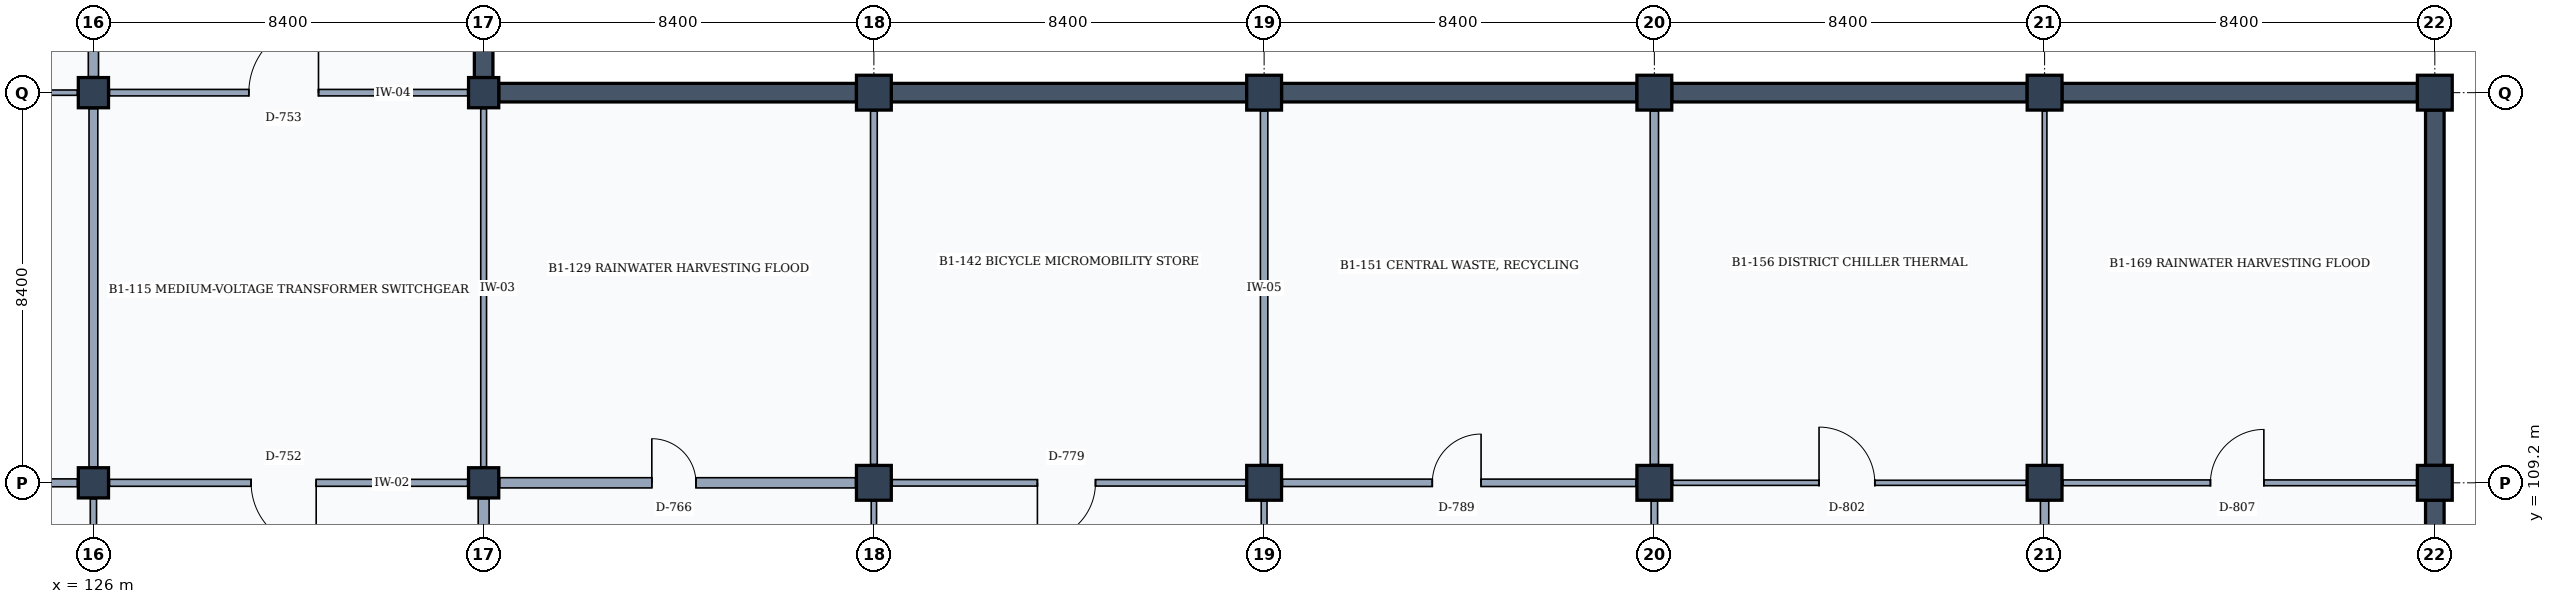
"""IFC4 building model, lengths in metres.
Left out: names, types, materials, properties, quantities, classifications, styles, units other than length and angle.
Written with IfcOpenShell. Run it as: python <this file> out.ifc"""

import sys

from ifc_helpers import new_model, si_unit, direction, frame, frame_2d, origin, origin_2d, place, context, subcontext, project, spatial, rectangle, extrude, element, fill, save


model = new_model("IFC4")
c1 = context("Model", 3, precision=1e-05, world=origin(), true_north=direction((0.0, 1.0)))
c2 = subcontext(c1, "Body", "Model", "MODEL_VIEW")
j1 = project(units=[si_unit("LENGTHUNIT", "METRE"), si_unit("PLANEANGLEUNIT", "RADIAN")], contexts=[c1])
p1 = place(None, origin())
s1 = spatial("IfcSite", under=j1, at=p1, CompositionType="ELEMENT")
p2 = place(p1, origin())
s2 = spatial("IfcBuilding", under=s1, at=p2, CompositionType="ELEMENT")
p3 = place(p2, frame((0.0, 0.0, -4.2)))
s3 = spatial("IfcBuildingStorey", under=s2, at=p3, CompositionType="ELEMENT", Elevation=-4.2)
for number, where, z_axis, x_axis in (
    (1, (126.0, 109.2, 0.0), (0.0, 0.0, 1.0), (1.0, 0.0, 0.0)),
    (2, (126.0, 117.6, 0.0), (0.0, 0.0, 1.0), (1.0, 0.0, 0.0)),
    (3, (134.4, 109.2, 0.0), (0.0, 0.0, 1.0), (1.0, 0.0, 0.0)),
    (4, (134.4, 117.6, 0.0), (0.0, 0.0, 1.0), (1.0, 0.0, 0.0)),
):
    element("IfcColumn", number, at=place(p3, frame(where, z_axis=z_axis, x_axis=x_axis)), inside=s3, PredefinedType="COLUMN", context=c2, shape_type="SweptSolid", body=[
        extrude(rectangle(XDim=0.65, YDim=0.65, at=origin_2d()), origin(), (0.0, 0.0, 1.0), 4.2),
    ])
for number, where, z_axis, x_axis in (
    (5, (142.8, 109.2, 0.0), (0.0, 0.0, 1.0), (1.0, 0.0, 0.0)),
    (6, (142.8, 117.6, 0.0), (0.0, 0.0, 1.0), (1.0, 0.0, 0.0)),
    (7, (151.2, 109.2, 0.0), (0.0, 0.0, 1.0), (1.0, 0.0, 0.0)),
    (8, (151.2, 117.6, 0.0), (0.0, 0.0, 1.0), (1.0, 0.0, 0.0)),
    (9, (159.6, 109.2, 0.0), (0.0, 0.0, 1.0), (1.0, 0.0, 0.0)),
    (10, (159.6, 117.6, 0.0), (0.0, 0.0, 1.0), (1.0, 0.0, 0.0)),
    (11, (168.0, 109.2, 0.0), (0.0, 0.0, 1.0), (1.0, 0.0, 0.0)),
    (12, (168.0, 117.6, 0.0), (0.0, 0.0, 1.0), (1.0, 0.0, 0.0)),
    (13, (176.4, 109.2, 0.0), (0.0, 0.0, 1.0), (1.0, 0.0, 0.0)),
    (14, (176.4, 117.6, 0.0), (0.0, 0.0, 1.0), (1.0, 0.0, 0.0)),
):
    element("IfcColumn", number, at=place(p3, frame(where, z_axis=z_axis, x_axis=x_axis)), inside=s3, PredefinedType="COLUMN", context=c2, shape_type="SweptSolid", body=[
        extrude(rectangle(XDim=0.75, YDim=0.75, at=origin_2d()), origin(), (0.0, 0.0, 1.0), 4.2),
    ])
p4 = place(p3, frame((134.4, 125.675, 0.0), z_axis=(0.0, 0.0, 1.0), x_axis=(0.0, -1.0, 0.0)))
e15 = element("IfcWall", 15, at=p4, inside=s3, PredefinedType="STANDARD", context=c2, shape_type="SweptSolid", body=[
    extrude(rectangle(XDim=7.75, YDim=0.4, at=frame_2d((3.875, 0.0))), origin(), (0.0, 0.0, 1.0), 3.88),
])
p5 = place(p3, frame((134.725, 117.6, 0.0), z_axis=(0.0, 0.0, 1.0), x_axis=(1.0, 0.0, 0.0)))
e16 = element("IfcWall", 16, at=p5, inside=s3, PredefinedType="STANDARD", context=c2, shape_type="SweptSolid", body=[
    extrude(rectangle(XDim=7.7, YDim=0.4, at=frame_2d((3.85, 0.0))), origin(), (0.0, 0.0, 1.0), 3.88),
])
p6 = place(p3, frame((143.175, 117.6, 0.0), z_axis=(0.0, 0.0, 1.0), x_axis=(1.0, 0.0, 0.0)))
e17 = element("IfcWall", 17, at=p6, inside=s3, PredefinedType="STANDARD", context=c2, shape_type="SweptSolid", body=[
    extrude(rectangle(XDim=7.65, YDim=0.4, at=frame_2d((3.825, 0.0))), origin(), (0.0, 0.0, 1.0), 3.88),
])
p7 = place(p3, frame((151.575, 117.6, 0.0), z_axis=(0.0, 0.0, 1.0), x_axis=(1.0, 0.0, 0.0)))
e18 = element("IfcWall", 18, at=p7, inside=s3, PredefinedType="STANDARD", context=c2, shape_type="SweptSolid", body=[
    extrude(rectangle(XDim=7.65, YDim=0.4, at=frame_2d((3.825, 0.0))), origin(), (0.0, 0.0, 1.0), 3.88),
])
for number, where, z_axis, x_axis in (
    (19, (159.975, 117.6, 0.0), (0.0, 0.0, 1.0), (1.0, 0.0, 0.0)),
    (20, (176.4, 108.825, 0.0), (0.0, 0.0, 1.0), (0.0, -1.0, 0.0)),
    (21, (168.375, 117.6, 0.0), (0.0, 0.0, 1.0), (1.0, 0.0, 0.0)),
):
    element("IfcWall", number, at=place(p3, frame(where, z_axis=z_axis, x_axis=x_axis)), inside=s3, PredefinedType="STANDARD", context=c2, shape_type="SweptSolid", body=[
        extrude(rectangle(XDim=7.65, YDim=0.4, at=frame_2d((3.825, 0.0))), origin(), (0.0, 0.0, 1.0), 3.88),
    ])
p8 = place(p3, frame((176.4, 117.225, 0.0), z_axis=(0.0, 0.0, 1.0), x_axis=(0.0, -1.0, 0.0)))
e22 = element("IfcWall", 22, at=p8, inside=s3, PredefinedType="STANDARD", context=c2, shape_type="SweptSolid", body=[
    extrude(rectangle(XDim=7.65, YDim=0.4, at=frame_2d((3.825, 0.0))), origin(), (0.0, 0.0, 1.0), 3.88),
])
p9 = place(p3, frame((126.0, 101.145, 0.0), z_axis=(0.0, 0.0, 1.0), x_axis=(0.0, 1.0, 0.0)))
e23 = element("IfcWall", 23, at=p9, inside=s3, PredefinedType="PARTITIONING", context=c2, shape_type="SweptSolid", body=[
    extrude(rectangle(XDim=7.71, YDim=0.135, at=frame_2d((3.855, 0.0))), origin(), (0.0, 0.0, 1.0), 3.23),
])
p10 = place(p9, frame((2.975, 0.0, 0.0)))
e24 = element("IfcOpeningElement", 24, at=p10, cuts=e23, PredefinedType="OPENING", context=c2, shape_type="SweptSolid", body=[
    extrude(rectangle(XDim=1.55, YDim=2.35, at=frame_2d((0.775, 1.175))), frame((0.0, 0.077, 0.0), z_axis=(0.0, -1.0, 0.0), x_axis=(1.0, 0.0, 0.0)), (0.0, 0.0, 1.0), 0.155),
])
p11 = place(p3, frame((117.945, 109.2, 0.0), z_axis=(0.0, 0.0, 1.0), x_axis=(1.0, 0.0, 0.0)))
e25 = element("IfcWall", 25, at=p11, inside=s3, PredefinedType="PARTITIONING", context=c2, shape_type="SweptSolid", body=[
    extrude(rectangle(XDim=7.71, YDim=0.17, at=frame_2d((3.855, 0.0))), origin(), (0.0, 0.0, 1.0), 2.93),
])
p12 = place(p11, frame((2.9, 0.0, 0.0)))
e26 = element("IfcOpeningElement", 26, at=p12, cuts=e25, PredefinedType="OPENING", context=c2, shape_type="SweptSolid", body=[
    extrude(rectangle(XDim=1.7, YDim=2.3, at=frame_2d((0.85, 1.15))), frame((0.0, 0.095, 0.0), z_axis=(0.0, -1.0, 0.0), x_axis=(1.0, 0.0, 0.0)), (0.0, 0.0, 1.0), 0.19),
])
p13 = place(p3, frame((126.0, 109.545, 0.0), z_axis=(0.0, 0.0, 1.0), x_axis=(0.0, 1.0, 0.0)))
e27 = element("IfcWall", 27, at=p13, inside=s3, PredefinedType="PARTITIONING", context=c2, shape_type="SweptSolid", body=[
    extrude(rectangle(XDim=7.71, YDim=0.19, at=frame_2d((3.855, 0.0))), origin(), (0.0, 0.0, 1.0), 3.23),
])
p14 = place(p3, frame((117.945, 117.6, 0.0), z_axis=(0.0, 0.0, 1.0), x_axis=(1.0, 0.0, 0.0)))
e28 = element("IfcWall", 28, at=p14, inside=s3, PredefinedType="PARTITIONING", context=c2, shape_type="SweptSolid", body=[
    extrude(rectangle(XDim=7.71, YDim=0.115, at=frame_2d((3.855, 0.0))), origin(), (0.0, 0.0, 1.0), 2.93),
])
p15 = place(p14, frame((2.8, 0.0, 0.0)))
e29 = element("IfcOpeningElement", 29, at=p15, cuts=e28, PredefinedType="OPENING", context=c2, shape_type="SweptSolid", body=[
    extrude(rectangle(XDim=1.9, YDim=2.4, at=frame_2d((0.95, 1.2))), frame((0.0, 0.067, 0.0), z_axis=(0.0, -1.0, 0.0), x_axis=(1.0, 0.0, 0.0)), (0.0, 0.0, 1.0), 0.135),
])
p16 = place(p3, frame((126.0, 117.945, 0.0), z_axis=(0.0, 0.0, 1.0), x_axis=(0.0, 1.0, 0.0)))
e30 = element("IfcWall", 30, at=p16, inside=s3, PredefinedType="PARTITIONING", context=c2, shape_type="SweptSolid", body=[
    extrude(rectangle(XDim=7.71, YDim=0.22, at=frame_2d((3.855, 0.0))), origin(), (0.0, 0.0, 1.0), 3.23),
])
p17 = place(p3, frame((134.4, 101.145, 0.0), z_axis=(0.0, 0.0, 1.0), x_axis=(0.0, 1.0, 0.0)))
e31 = element("IfcWall", 31, at=p17, inside=s3, PredefinedType="PARTITIONING", context=c2, shape_type="SweptSolid", body=[
    extrude(rectangle(XDim=7.71, YDim=0.235, at=frame_2d((3.855, 0.0))), origin(), (0.0, 0.0, 1.0), 3.08),
])
p18 = place(p17, frame((3.15, 0.0, 0.0)))
e32 = element("IfcOpeningElement", 32, at=p18, cuts=e31, PredefinedType="OPENING", context=c2, shape_type="SweptSolid", body=[
    extrude(rectangle(XDim=1.2, YDim=2.2, at=frame_2d((0.6, 1.1))), frame((0.0, 0.127, 0.0), z_axis=(0.0, -1.0, 0.0), x_axis=(1.0, 0.0, 0.0)), (0.0, 0.0, 1.0), 0.255),
])
p19 = place(p3, frame((126.345, 109.2, 0.0), z_axis=(0.0, 0.0, 1.0), x_axis=(1.0, 0.0, 0.0)))
e33 = element("IfcWall", 33, at=p19, inside=s3, PredefinedType="PARTITIONING", context=c2, shape_type="SweptSolid", body=[
    extrude(rectangle(XDim=7.71, YDim=0.15, at=frame_2d((3.855, 0.0))), origin(), (0.0, 0.0, 1.0), 2.93),
])
p20 = place(p19, frame((3.05, 0.0, 0.0)))
e34 = element("IfcOpeningElement", 34, at=p20, cuts=e33, PredefinedType="OPENING", context=c2, shape_type="SweptSolid", body=[
    extrude(rectangle(XDim=1.4, YDim=2.25, at=frame_2d((0.7, 1.125))), frame((0.0, 0.085, 0.0), z_axis=(0.0, -1.0, 0.0), x_axis=(1.0, 0.0, 0.0)), (0.0, 0.0, 1.0), 0.17),
])
p21 = place(p3, frame((134.4, 109.545, 0.0), z_axis=(0.0, 0.0, 1.0), x_axis=(0.0, 1.0, 0.0)))
e35 = element("IfcWall", 35, at=p21, inside=s3, PredefinedType="PARTITIONING", context=c2, shape_type="SweptSolid", body=[
    extrude(rectangle(XDim=7.71, YDim=0.125, at=frame_2d((3.855, 0.0))), origin(), (0.0, 0.0, 1.0), 3.08),
])
p22 = place(p3, frame((126.345, 117.6, 0.0), z_axis=(0.0, 0.0, 1.0), x_axis=(1.0, 0.0, 0.0)))
e36 = element("IfcWall", 36, at=p22, inside=s3, PredefinedType="PARTITIONING", context=c2, shape_type="SweptSolid", body=[
    extrude(rectangle(XDim=7.71, YDim=0.14, at=frame_2d((3.855, 0.0))), origin(), (0.0, 0.0, 1.0), 2.93),
])
p23 = place(p22, frame((3.0, 0.0, 0.0)))
e37 = element("IfcOpeningElement", 37, at=p23, cuts=e36, PredefinedType="OPENING", context=c2, shape_type="SweptSolid", body=[
    extrude(rectangle(XDim=1.5, YDim=2.3, at=frame_2d((0.75, 1.15))), frame((0.0, 0.08, 0.0), z_axis=(0.0, -1.0, 0.0), x_axis=(1.0, 0.0, 0.0)), (0.0, 0.0, 1.0), 0.16),
])
p24 = place(p3, frame((142.8, 101.195, 0.0), z_axis=(0.0, 0.0, 1.0), x_axis=(0.0, 1.0, 0.0)))
e38 = element("IfcWall", 38, at=p24, inside=s3, PredefinedType="PARTITIONING", context=c2, shape_type="SweptSolid", body=[
    extrude(rectangle(XDim=7.61, YDim=0.115, at=frame_2d((3.805, 0.0))), origin(), (0.0, 0.0, 1.0), 3.1),
])
p25 = place(p24, frame((3.25, 0.0, 0.0)))
e39 = element("IfcOpeningElement", 39, at=p25, cuts=e38, PredefinedType="OPENING", context=c2, shape_type="SweptSolid", body=[
    extrude(rectangle(XDim=1.0, YDim=2.15, at=frame_2d((0.5, 1.075))), frame((0.0, 0.067, 0.0), z_axis=(0.0, -1.0, 0.0), x_axis=(1.0, 0.0, 0.0)), (0.0, 0.0, 1.0), 0.135),
])
p26 = place(p3, frame((134.745, 109.2, 0.0), z_axis=(0.0, 0.0, 1.0), x_axis=(1.0, 0.0, 0.0)))
e40 = element("IfcWall", 40, at=p26, inside=s3, PredefinedType="PARTITIONING", context=c2, shape_type="SweptSolid", body=[
    extrude(rectangle(XDim=7.66, YDim=0.22, at=frame_2d((3.83, 0.0))), origin(), (0.0, 0.0, 1.0), 3.03),
])
p27 = place(p26, frame((3.275, 0.0, 0.0)))
e41 = element("IfcOpeningElement", 41, at=p27, cuts=e40, PredefinedType="OPENING", context=c2, shape_type="SweptSolid", body=[
    extrude(rectangle(XDim=0.95, YDim=2.15, at=frame_2d((0.475, 1.075))), frame((0.0, 0.12, 0.0), z_axis=(0.0, -1.0, 0.0), x_axis=(1.0, 0.0, 0.0)), (0.0, 0.0, 1.0), 0.24),
])
p28 = place(p3, frame((142.8, 109.595, 0.0), z_axis=(0.0, 0.0, 1.0), x_axis=(0.0, 1.0, 0.0)))
e42 = element("IfcWall", 42, at=p28, inside=s3, PredefinedType="PARTITIONING", context=c2, shape_type="SweptSolid", body=[
    extrude(rectangle(XDim=7.61, YDim=0.145, at=frame_2d((3.805, 0.0))), origin(), (0.0, 0.0, 1.0), 3.1),
])
p29 = place(p3, frame((151.2, 101.245, 0.0), z_axis=(0.0, 0.0, 1.0), x_axis=(0.0, 1.0, 0.0)))
e43 = element("IfcWall", 43, at=p29, inside=s3, PredefinedType="PARTITIONING", context=c2, shape_type="SweptSolid", body=[
    extrude(rectangle(XDim=7.56, YDim=0.125, at=frame_2d((3.78, 0.0))), origin(), (0.0, 0.0, 1.0), 3.1),
])
p30 = place(p29, frame((3.3, 0.0, 0.0)))
e44 = element("IfcOpeningElement", 44, at=p30, cuts=e43, PredefinedType="OPENING", context=c2, shape_type="SweptSolid", body=[
    extrude(rectangle(XDim=0.9, YDim=2.1, at=frame_2d((0.45, 1.05))), frame((0.0, 0.073, 0.0), z_axis=(0.0, -1.0, 0.0), x_axis=(1.0, 0.0, 0.0)), (0.0, 0.0, 1.0), 0.145),
])
p31 = place(p3, frame((143.195, 109.2, 0.0), z_axis=(0.0, 0.0, 1.0), x_axis=(1.0, 0.0, 0.0)))
e45 = element("IfcWall", 45, at=p31, inside=s3, PredefinedType="PARTITIONING", context=c2, shape_type="SweptSolid", body=[
    extrude(rectangle(XDim=7.61, YDim=0.14, at=frame_2d((3.805, 0.0))), origin(), (0.0, 0.0, 1.0), 3.05),
])
p32 = place(p31, frame((3.125, 0.0, 0.0)))
e46 = element("IfcOpeningElement", 46, at=p32, cuts=e45, PredefinedType="OPENING", context=c2, shape_type="SweptSolid", body=[
    extrude(rectangle(XDim=1.25, YDim=2.3, at=frame_2d((0.625, 1.15))), frame((0.0, 0.08, 0.0), z_axis=(0.0, -1.0, 0.0), x_axis=(1.0, 0.0, 0.0)), (0.0, 0.0, 1.0), 0.16),
])
p33 = place(p3, frame((151.2, 109.595, 0.0), z_axis=(0.0, 0.0, 1.0), x_axis=(0.0, 1.0, 0.0)))
e47 = element("IfcWall", 47, at=p33, inside=s3, PredefinedType="PARTITIONING", context=c2, shape_type="SweptSolid", body=[
    extrude(rectangle(XDim=7.61, YDim=0.16, at=frame_2d((3.805, 0.0))), origin(), (0.0, 0.0, 1.0), 3.1),
])
p34 = place(p3, frame((159.6, 101.245, 0.0), z_axis=(0.0, 0.0, 1.0), x_axis=(0.0, 1.0, 0.0)))
e48 = element("IfcWall", 48, at=p34, inside=s3, PredefinedType="PARTITIONING", context=c2, shape_type="SweptSolid", body=[
    extrude(rectangle(XDim=7.56, YDim=0.14, at=frame_2d((3.78, 0.0))), origin(), (0.0, 0.0, 1.0), 3.1),
])
p35 = place(p34, frame((2.925, 0.0, 0.0)))
e49 = element("IfcOpeningElement", 49, at=p35, cuts=e48, PredefinedType="OPENING", context=c2, shape_type="SweptSolid", body=[
    extrude(rectangle(XDim=1.65, YDim=2.25, at=frame_2d((0.825, 1.125))), frame((0.0, 0.08, 0.0), z_axis=(0.0, -1.0, 0.0), x_axis=(1.0, 0.0, 0.0)), (0.0, 0.0, 1.0), 0.16),
])
p36 = place(p3, frame((151.595, 109.2, 0.0), z_axis=(0.0, 0.0, 1.0), x_axis=(1.0, 0.0, 0.0)))
e50 = element("IfcWall", 50, at=p36, inside=s3, PredefinedType="PARTITIONING", context=c2, shape_type="SweptSolid", body=[
    extrude(rectangle(XDim=7.61, YDim=0.16, at=frame_2d((3.805, 0.0))), origin(), (0.0, 0.0, 1.0), 3.05),
])
p37 = place(p36, frame((3.225, 0.0, 0.0)))
e51 = element("IfcOpeningElement", 51, at=p37, cuts=e50, PredefinedType="OPENING", context=c2, shape_type="SweptSolid", body=[
    extrude(rectangle(XDim=1.05, YDim=2.2, at=frame_2d((0.525, 1.1))), frame((0.0, 0.09, 0.0), z_axis=(0.0, -1.0, 0.0), x_axis=(1.0, 0.0, 0.0)), (0.0, 0.0, 1.0), 0.18),
])
p38 = place(p3, frame((159.6, 109.595, 0.0), z_axis=(0.0, 0.0, 1.0), x_axis=(0.0, 1.0, 0.0)))
e52 = element("IfcWall", 52, at=p38, inside=s3, PredefinedType="PARTITIONING", context=c2, shape_type="SweptSolid", body=[
    extrude(rectangle(XDim=7.61, YDim=0.18, at=frame_2d((3.805, 0.0))), origin(), (0.0, 0.0, 1.0), 3.1),
])
p39 = place(p3, frame((168.0, 101.195, 0.0), z_axis=(0.0, 0.0, 1.0), x_axis=(0.0, 1.0, 0.0)))
e53 = element("IfcWall", 53, at=p39, inside=s3, PredefinedType="PARTITIONING", context=c2, shape_type="SweptSolid", body=[
    extrude(rectangle(XDim=7.61, YDim=0.18, at=frame_2d((3.805, 0.0))), origin(), (0.0, 0.0, 1.0), 3.1),
])
p40 = place(p3, frame((159.995, 109.2, 0.0), z_axis=(0.0, 0.0, 1.0), x_axis=(1.0, 0.0, 0.0)))
e54 = element("IfcWall", 54, at=p40, inside=s3, PredefinedType="PARTITIONING", context=c2, shape_type="SweptSolid", body=[
    extrude(rectangle(XDim=7.61, YDim=0.11, at=frame_2d((3.805, 0.0))), origin(), (0.0, 0.0, 1.0), 3.05),
])
p41 = place(p40, frame((3.15, 0.0, 0.0)))
e55 = element("IfcOpeningElement", 55, at=p41, cuts=e54, PredefinedType="OPENING", context=c2, shape_type="SweptSolid", body=[
    extrude(rectangle(XDim=1.2, YDim=2.2, at=frame_2d((0.6, 1.1))), frame((0.0, 0.065, 0.0), z_axis=(0.0, -1.0, 0.0), x_axis=(1.0, 0.0, 0.0)), (0.0, 0.0, 1.0), 0.13),
])
p42 = place(p3, frame((168.0, 109.595, 0.0), z_axis=(0.0, 0.0, 1.0), x_axis=(0.0, 1.0, 0.0)))
e56 = element("IfcWall", 56, at=p42, inside=s3, PredefinedType="MOVABLE", context=c2, shape_type="SweptSolid", body=[
    extrude(rectangle(XDim=7.61, YDim=0.1, at=frame_2d((3.805, 0.0))), origin(), (0.0, 0.0, 1.0), 3.1),
])
p43 = place(p3, frame((168.395, 109.2, 0.0), z_axis=(0.0, 0.0, 1.0), x_axis=(1.0, 0.0, 0.0)))
e57 = element("IfcWall", 57, at=p43, inside=s3, PredefinedType="PARTITIONING", context=c2, shape_type="SweptSolid", body=[
    extrude(rectangle(XDim=7.61, YDim=0.125, at=frame_2d((3.805, 0.0))), origin(), (0.0, 0.0, 1.0), 3.05),
])
p44 = place(p43, frame((3.175, 0.0, 0.0)))
e58 = element("IfcOpeningElement", 58, at=p44, cuts=e57, PredefinedType="OPENING", context=c2, shape_type="SweptSolid", body=[
    extrude(rectangle(XDim=1.15, YDim=2.25, at=frame_2d((0.575, 1.125))), frame((0.0, 0.073, 0.0), z_axis=(0.0, -1.0, 0.0), x_axis=(1.0, 0.0, 0.0)), (0.0, 0.0, 1.0), 0.145),
])
p45 = place(p20, frame((1.4, 0.0, 0.0), z_axis=(0.0, 0.0, 1.0), x_axis=(-1.0, 0.0, 0.0)))
e59 = element("IfcDoor", 59, at=p45, inside=s3, OperationType="SINGLE_SWING_LEFT", PredefinedType="DOOR", context=c2, shape_type="SweptSolid", body=[
    extrude(rectangle(XDim=1.4, YDim=2.25, at=frame_2d((0.7, 1.125))), frame((0.0, 0.025, 0.0), z_axis=(0.0, -1.0, 0.0), x_axis=(1.0, 0.0, 0.0)), (0.0, 0.0, 1.0), 0.05),
])
fill(e34, e59)
p46 = place(p23, origin())
e60 = element("IfcDoor", 60, at=p46, inside=s3, OperationType="SINGLE_SWING_RIGHT", PredefinedType="DOOR", context=c2, shape_type="SweptSolid", body=[
    extrude(rectangle(XDim=1.5, YDim=2.3, at=frame_2d((0.75, 1.15))), frame((0.0, 0.025, 0.0), z_axis=(0.0, -1.0, 0.0), x_axis=(1.0, 0.0, 0.0)), (0.0, 0.0, 1.0), 0.05),
])
fill(e37, e60)
p47 = place(p27, origin())
e61 = element("IfcDoor", 61, at=p47, inside=s3, OperationType="SINGLE_SWING_LEFT", PredefinedType="DOOR", context=c2, shape_type="SweptSolid", body=[
    extrude(rectangle(XDim=0.95, YDim=2.15, at=frame_2d((0.475, 1.075))), frame((0.0, 0.025, 0.0), z_axis=(0.0, -1.0, 0.0), x_axis=(1.0, 0.0, 0.0)), (0.0, 0.0, 1.0), 0.05),
])
fill(e41, e61)
p48 = place(p32, frame((1.25, 0.0, 0.0), z_axis=(0.0, 0.0, 1.0), x_axis=(-1.0, 0.0, 0.0)))
e62 = element("IfcDoor", 62, at=p48, inside=s3, OperationType="SINGLE_SWING_RIGHT", PredefinedType="DOOR", context=c2, shape_type="SweptSolid", body=[
    extrude(rectangle(XDim=1.25, YDim=2.3, at=frame_2d((0.625, 1.15))), frame((0.0, 0.025, 0.0), z_axis=(0.0, -1.0, 0.0), x_axis=(1.0, 0.0, 0.0)), (0.0, 0.0, 1.0), 0.05),
])
fill(e46, e62)
p49 = place(p37, origin())
e63 = element("IfcDoor", 63, at=p49, inside=s3, OperationType="SINGLE_SWING_RIGHT", PredefinedType="DOOR", context=c2, shape_type="SweptSolid", body=[
    extrude(rectangle(XDim=1.05, YDim=2.2, at=frame_2d((0.525, 1.1))), frame((0.0, 0.025, 0.0), z_axis=(0.0, -1.0, 0.0), x_axis=(1.0, 0.0, 0.0)), (0.0, 0.0, 1.0), 0.05),
])
fill(e51, e63)
p50 = place(p41, origin())
e64 = element("IfcDoor", 64, at=p50, inside=s3, OperationType="SINGLE_SWING_LEFT", PredefinedType="DOOR", context=c2, shape_type="SweptSolid", body=[
    extrude(rectangle(XDim=1.2, YDim=2.2, at=frame_2d((0.6, 1.1))), frame((0.0, 0.025, 0.0), z_axis=(0.0, -1.0, 0.0), x_axis=(1.0, 0.0, 0.0)), (0.0, 0.0, 1.0), 0.05),
])
fill(e55, e64)
p51 = place(p44, origin())
e65 = element("IfcDoor", 65, at=p51, inside=s3, OperationType="SINGLE_SWING_RIGHT", PredefinedType="DOOR", context=c2, shape_type="SweptSolid", body=[
    extrude(rectangle(XDim=1.15, YDim=2.25, at=frame_2d((0.575, 1.125))), frame((0.0, 0.025, 0.0), z_axis=(0.0, -1.0, 0.0), x_axis=(1.0, 0.0, 0.0)), (0.0, 0.0, 1.0), 0.05),
])
fill(e58, e65)
save(model, sys.argv[1])
